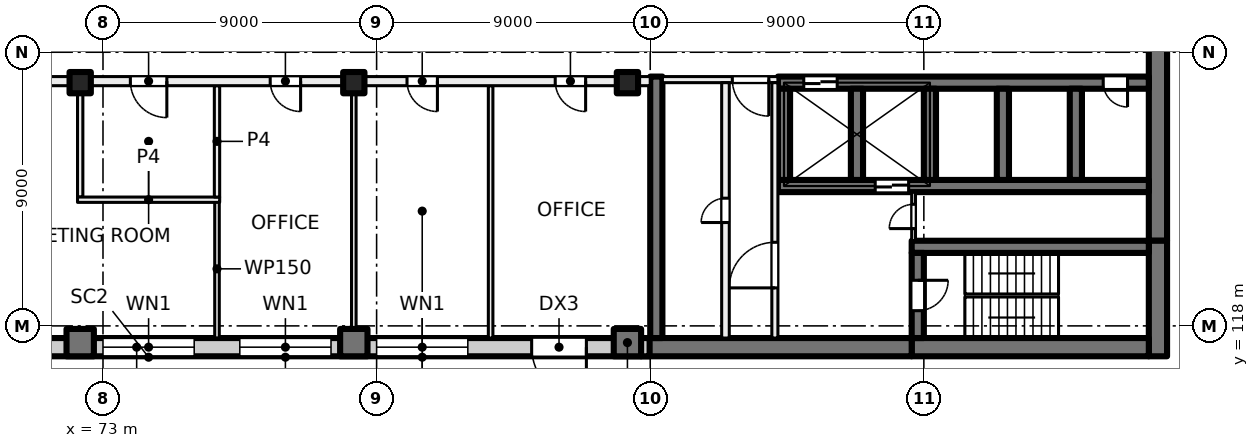
"""IFC4 building model, lengths in metres.
Left out: names, types, materials, properties, quantities, classifications, styles, units other than length and angle.
Written with IfcOpenShell. Run it as: python <this file> out.ifc"""

import sys

from ifc_helpers import new_model, si_unit, direction, frame, frame_2d, origin, origin_2d, place, context, subcontext, project, spatial, rectangle, extrude, element, fill, save


model = new_model("IFC4")
c1 = context("Model", 3, precision=1e-05, world=origin(), true_north=direction((0.0, 1.0)))
c2 = subcontext(c1, "Body", "Model", "MODEL_VIEW")
j1 = project(units=[si_unit("LENGTHUNIT", "METRE"), si_unit("PLANEANGLEUNIT", "RADIAN")], contexts=[c1])
p1 = place(None, origin())
s1 = spatial("IfcSite", under=j1, at=p1, CompositionType="ELEMENT")
p2 = place(p1, origin())
s2 = spatial("IfcBuilding", under=s1, at=p2, CompositionType="ELEMENT")
p3 = place(p2, frame((0.0, 0.0, 27.5)))
s3 = spatial("IfcBuildingStorey", under=s2, at=p3, CompositionType="ELEMENT", Elevation=27.5)
for number, where, z_axis, x_axis in (
    (1, (72.25, 126.0, 0.0), (0.0, 0.0, 1.0), (1.0, 0.0, 0.0)),
    (2, (81.25, 126.0, 0.0), (0.0, 0.0, 1.0), (1.0, 0.0, 0.0)),
    (3, (90.25, 126.0, 0.0), (0.0, 0.0, 1.0), (1.0, 0.0, 0.0)),
):
    element("IfcColumn", number, at=place(p3, frame(where, z_axis=z_axis, x_axis=x_axis)), inside=s3, PredefinedType="COLUMN", context=c2, shape_type="SweptSolid", body=[
        extrude(rectangle(XDim=0.7, YDim=0.7, at=origin_2d()), origin(), (0.0, 0.0, 1.0), 4.0),
    ])
for number, where, z_axis, x_axis in (
    (4, (72.25, 117.45, 0.0), (0.0, 0.0, 1.0), (1.0, 0.0, 0.0)),
    (5, (81.25, 117.45, 0.0), (0.0, 0.0, 1.0), (1.0, 0.0, 0.0)),
    (6, (90.25, 117.45, 0.0), (0.0, 0.0, 1.0), (1.0, 0.0, 0.0)),
):
    element("IfcColumn", number, at=place(p3, frame(where, z_axis=z_axis, x_axis=x_axis)), inside=s3, PredefinedType="COLUMN", context=c2, shape_type="SweptSolid", body=[
        extrude(rectangle(XDim=0.9, YDim=0.9, at=origin_2d()), origin(), (0.0, 0.0, 1.0), 4.0),
    ])
p4 = place(p3, frame((107.7, 135.2, 0.0), z_axis=(0.0, 0.0, 1.0), x_axis=(0.0, -1.0, 0.0)))
e7 = element("IfcWall", 7, at=p4, inside=s3, PredefinedType="SHEAR", context=c2, shape_type="SweptSolid", body=[
    extrude(rectangle(XDim=14.4, YDim=0.6, at=frame_2d((7.2, 0.0))), origin(), (0.0, 0.0, 1.0), 4.0),
])
p5 = place(p3, frame((107.7, 120.8, 0.0), z_axis=(0.0, 0.0, 1.0), x_axis=(0.0, -1.0, 0.0)))
e8 = element("IfcWall", 8, at=p5, inside=s3, PredefinedType="SHEAR", context=c2, shape_type="SweptSolid", body=[
    extrude(rectangle(XDim=3.8, YDim=0.6, at=frame_2d((1.9, 0.0))), origin(), (0.0, 0.0, 1.0), 4.0),
])
p6 = place(p3, frame((107.4, 117.3, 0.0), z_axis=(0.0, 0.0, 1.0), x_axis=(-1.0, 0.0, 0.0)))
e9 = element("IfcWall", 9, at=p6, inside=s3, PredefinedType="SHEAR", context=c2, shape_type="SweptSolid", body=[
    extrude(rectangle(XDim=7.8, YDim=0.6, at=frame_2d((3.9, 0.0))), origin(), (0.0, 0.0, 1.0), 4.0),
])
p7 = place(p3, frame((99.6, 117.3, 0.0), z_axis=(0.0, 0.0, 1.0), x_axis=(-1.0, 0.0, 0.0)))
e10 = element("IfcWall", 10, at=p7, inside=s3, PredefinedType="SHEAR", context=c2, shape_type="SweptSolid", body=[
    extrude(rectangle(XDim=8.9, YDim=0.6, at=frame_2d((4.45, 0.0))), origin(), (0.0, 0.0, 1.0), 4.0),
])
p8 = place(p3, frame((107.4, 120.6, 0.0), z_axis=(0.0, 0.0, 1.0), x_axis=(-1.0, 0.0, 0.0)))
e11 = element("IfcWall", 11, at=p8, inside=s3, PredefinedType="SHEAR", context=c2, shape_type="SweptSolid", body=[
    extrude(rectangle(XDim=7.8, YDim=0.4, at=frame_2d((3.9, 0.0))), origin(), (0.0, 0.0, 1.0), 4.0),
])
p9 = place(p3, frame((99.8, 120.4, 0.0), z_axis=(0.0, 0.0, 1.0), x_axis=(0.0, -1.0, 0.0)))
e12 = element("IfcWall", 12, at=p9, inside=s3, PredefinedType="SHEAR", context=c2, shape_type="SweptSolid", body=[
    extrude(rectangle(XDim=2.8, YDim=0.4, at=frame_2d((1.4, 0.0))), origin(), (0.0, 0.0, 1.0), 4.0),
])
p10 = place(p9, frame((0.9, 0.0, 0.0)))
e13 = element("IfcOpeningElement", 13, at=p10, cuts=e12, PredefinedType="OPENING", context=c2, shape_type="SweptSolid", body=[
    extrude(rectangle(XDim=1.0, YDim=2.1, at=frame_2d((0.5, 1.05))), frame((0.0, 0.21, 0.0), z_axis=(0.0, -1.0, 0.0), x_axis=(1.0, 0.0, 0.0)), (0.0, 0.0, 1.0), 0.42),
])
p11 = place(p3, frame((107.4, 126.0, 0.0), z_axis=(0.0, 0.0, 1.0), x_axis=(-1.0, 0.0, 0.0)))
e14 = element("IfcWall", 14, at=p11, inside=s3, PredefinedType="SHEAR", context=c2, shape_type="SweptSolid", body=[
    extrude(rectangle(XDim=12.2, YDim=0.4, at=frame_2d((6.1, 0.0))), origin(), (0.0, 0.0, 1.0), 4.0),
])
p12 = place(p11, frame((10.25, 0.0, 0.0)))
e15 = element("IfcOpeningElement", 15, at=p12, cuts=e14, PredefinedType="OPENING", context=c2, shape_type="SweptSolid", body=[
    extrude(rectangle(XDim=1.1, YDim=2.1, at=frame_2d((0.55, 1.05))), frame((0.0, 0.21, 0.0), z_axis=(0.0, -1.0, 0.0), x_axis=(1.0, 0.0, 0.0)), (0.0, 0.0, 1.0), 0.42),
])
p13 = place(p11, frame((0.7, 0.0, 0.0)))
e16 = element("IfcOpeningElement", 16, at=p13, cuts=e14, PredefinedType="OPENING", context=c2, shape_type="SweptSolid", body=[
    extrude(rectangle(XDim=0.8, YDim=2.1, at=frame_2d((0.4, 1.05))), frame((0.0, 0.21, 0.0), z_axis=(0.0, -1.0, 0.0), x_axis=(1.0, 0.0, 0.0)), (0.0, 0.0, 1.0), 0.42),
])
p14 = place(p3, frame((107.4, 122.6, 0.0), z_axis=(0.0, 0.0, 1.0), x_axis=(-1.0, 0.0, 0.0)))
e17 = element("IfcWall", 17, at=p14, inside=s3, PredefinedType="SHEAR", context=c2, shape_type="SweptSolid", body=[
    extrude(rectangle(XDim=12.2, YDim=0.4, at=frame_2d((6.1, 0.0))), origin(), (0.0, 0.0, 1.0), 4.0),
])
p15 = place(p14, frame((7.9, 0.0, 0.0)))
e18 = element("IfcOpeningElement", 18, at=p15, cuts=e17, PredefinedType="OPENING", context=c2, shape_type="SweptSolid", body=[
    extrude(rectangle(XDim=1.1, YDim=2.1, at=frame_2d((0.55, 1.05))), frame((0.0, 0.21, 0.0), z_axis=(0.0, -1.0, 0.0), x_axis=(1.0, 0.0, 0.0)), (0.0, 0.0, 1.0), 0.42),
])
for number, where, z_axis, x_axis in (
    (19, (105.0, 125.8, 0.0), (0.0, 0.0, 1.0), (0.0, -1.0, 0.0)),
    (20, (102.6, 125.8, 0.0), (0.0, 0.0, 1.0), (0.0, -1.0, 0.0)),
    (21, (100.2, 125.8, 0.0), (0.0, 0.0, 1.0), (0.0, -1.0, 0.0)),
    (22, (97.8, 125.8, 0.0), (0.0, 0.0, 1.0), (0.0, -1.0, 0.0)),
    (23, (95.4, 125.8, 0.0), (0.0, 0.0, 1.0), (0.0, -1.0, 0.0)),
):
    element("IfcWall", number, at=place(p3, frame(where, z_axis=z_axis, x_axis=x_axis)), inside=s3, PredefinedType="SHEAR", context=c2, shape_type="SweptSolid", body=[
        extrude(rectangle(XDim=3.0, YDim=0.4, at=frame_2d((1.5, 0.0))), origin(), (0.0, 0.0, 1.0), 4.0),
    ])
p16 = place(p3, frame((91.2, 126.2, 0.0), z_axis=(0.0, 0.0, 1.0), x_axis=(0.0, -1.0, 0.0)))
e24 = element("IfcWall", 24, at=p16, inside=s3, PredefinedType="SHEAR", context=c2, shape_type="SweptSolid", body=[
    extrude(rectangle(XDim=8.6, YDim=0.4, at=frame_2d((4.3, 0.0))), origin(), (0.0, 0.0, 1.0), 4.0),
])
p17 = place(p3, frame((90.98, 117.3, 0.0), z_axis=(0.0, 0.0, 1.0), x_axis=(-1.0, 0.0, 0.0)))
e25 = element("IfcWall", 25, at=p17, inside=s3, PredefinedType="SOLIDWALL", context=c2, shape_type="SweptSolid", body=[
    extrude(rectangle(XDim=33.745, YDim=0.6, at=frame_2d((16.873, 0.0))), origin(), (0.0, 0.0, 1.0), 3.625),
])
p18 = place(p17, frame((2.08, 0.0, 0.0)))
e26 = element("IfcOpeningElement", 26, at=p18, cuts=e25, PredefinedType="OPENING", context=c2, shape_type="SweptSolid", body=[
    extrude(rectangle(XDim=1.8, YDim=2.4, at=frame_2d((0.9, 1.2))), frame((0.0, 0.31, 0.0), z_axis=(0.0, -1.0, 0.0), x_axis=(1.0, 0.0, 0.0)), (0.0, 0.0, 1.0), 0.62),
])
p19 = place(p17, frame((5.98, 0.0, 0.9)))
e27 = element("IfcOpeningElement", 27, at=p19, cuts=e25, PredefinedType="OPENING", context=c2, shape_type="SweptSolid", body=[
    extrude(rectangle(XDim=3.0, YDim=2.4, at=frame_2d((1.5, 1.2))), frame((0.0, 0.31, 0.0), z_axis=(0.0, -1.0, 0.0), x_axis=(1.0, 0.0, 0.0)), (0.0, 0.0, 1.0), 0.62),
])
p20 = place(p17, frame((10.48, 0.0, 0.9)))
e28 = element("IfcOpeningElement", 28, at=p20, cuts=e25, PredefinedType="OPENING", context=c2, shape_type="SweptSolid", body=[
    extrude(rectangle(XDim=3.0, YDim=2.4, at=frame_2d((1.5, 1.2))), frame((0.0, 0.31, 0.0), z_axis=(0.0, -1.0, 0.0), x_axis=(1.0, 0.0, 0.0)), (0.0, 0.0, 1.0), 0.62),
])
p21 = place(p17, frame((14.98, 0.0, 0.9)))
e29 = element("IfcOpeningElement", 29, at=p21, cuts=e25, PredefinedType="OPENING", context=c2, shape_type="SweptSolid", body=[
    extrude(rectangle(XDim=3.0, YDim=2.4, at=frame_2d((1.5, 1.2))), frame((0.0, 0.31, 0.0), z_axis=(0.0, -1.0, 0.0), x_axis=(1.0, 0.0, 0.0)), (0.0, 0.0, 1.0), 0.62),
])
p22 = place(p17, frame((20.08, 0.0, 0.0)))
e30 = element("IfcOpeningElement", 30, at=p22, cuts=e25, PredefinedType="OPENING", context=c2, shape_type="SweptSolid", body=[
    extrude(rectangle(XDim=1.8, YDim=2.4, at=frame_2d((0.9, 1.2))), frame((0.0, 0.31, 0.0), z_axis=(0.0, -1.0, 0.0), x_axis=(1.0, 0.0, 0.0)), (0.0, 0.0, 1.0), 0.62),
])
p23 = place(p17, frame((23.98, 0.0, 0.9)))
e31 = element("IfcOpeningElement", 31, at=p23, cuts=e25, PredefinedType="OPENING", context=c2, shape_type="SweptSolid", body=[
    extrude(rectangle(XDim=3.0, YDim=2.4, at=frame_2d((1.5, 1.2))), frame((0.0, 0.31, 0.0), z_axis=(0.0, -1.0, 0.0), x_axis=(1.0, 0.0, 0.0)), (0.0, 0.0, 1.0), 0.62),
])
p24 = place(p17, frame((28.48, 0.0, 0.9)))
e32 = element("IfcOpeningElement", 32, at=p24, cuts=e25, PredefinedType="OPENING", context=c2, shape_type="SweptSolid", body=[
    extrude(rectangle(XDim=3.0, YDim=2.4, at=frame_2d((1.5, 1.2))), frame((0.0, 0.31, 0.0), z_axis=(0.0, -1.0, 0.0), x_axis=(1.0, 0.0, 0.0)), (0.0, 0.0, 1.0), 0.62),
])
p25 = place(p3, frame((95.2, 126.1, 0.0), z_axis=(0.0, 0.0, 1.0), x_axis=(-1.0, 0.0, 0.0)))
e33 = element("IfcWall", 33, at=p25, inside=s3, PredefinedType="PARTITIONING", context=c2, shape_type="SweptSolid", body=[
    extrude(rectangle(XDim=3.8, YDim=0.2, at=frame_2d((1.9, 0.0))), origin(), (0.0, 0.0, 1.0), 3.625),
])
p26 = place(p25, frame((0.3, 0.0, 0.0)))
e34 = element("IfcOpeningElement", 34, at=p26, cuts=e33, PredefinedType="OPENING", context=c2, shape_type="SweptSolid", body=[
    extrude(rectangle(XDim=1.2, YDim=2.1, at=frame_2d((0.6, 1.05))), frame((0.0, 0.11, 0.0), z_axis=(0.0, -1.0, 0.0), x_axis=(1.0, 0.0, 0.0)), (0.0, 0.0, 1.0), 0.22),
])
p27 = place(p3, frame((95.1, 117.6, 0.0), z_axis=(0.0, 0.0, 1.0), x_axis=(0.0, 1.0, 0.0)))
e35 = element("IfcWall", 35, at=p27, inside=s3, PredefinedType="PARTITIONING", context=c2, shape_type="SweptSolid", body=[
    extrude(rectangle(XDim=8.4, YDim=0.2, at=frame_2d((4.2, 0.0))), origin(), (0.0, 0.0, 1.0), 3.625),
])
p28 = place(p27, frame((1.65, 0.0, 0.0)))
e36 = element("IfcOpeningElement", 36, at=p28, cuts=e35, PredefinedType="OPENING", context=c2, shape_type="SweptSolid", body=[
    extrude(rectangle(XDim=1.5, YDim=2.1, at=frame_2d((0.75, 1.05))), frame((0.0, 0.11, 0.0), z_axis=(0.0, -1.0, 0.0), x_axis=(1.0, 0.0, 0.0)), (0.0, 0.0, 1.0), 0.22),
])
p29 = place(p3, frame((93.475, 117.6, 0.0), z_axis=(0.0, 0.0, 1.0), x_axis=(0.0, 1.0, 0.0)))
e37 = element("IfcWall", 37, at=p29, inside=s3, PredefinedType="PARTITIONING", context=c2, shape_type="SweptSolid", body=[
    extrude(rectangle(XDim=8.4, YDim=0.25, at=frame_2d((4.2, 0.0))), origin(), (0.0, 0.0, 1.0), 3.625),
])
p30 = place(p29, frame((3.8, 0.0, 0.0)))
e38 = element("IfcOpeningElement", 38, at=p30, cuts=e37, PredefinedType="OPENING", context=c2, shape_type="SweptSolid", body=[
    extrude(rectangle(XDim=0.8, YDim=2.1, at=frame_2d((0.4, 1.05))), frame((0.0, 0.135, 0.0), z_axis=(0.0, -1.0, 0.0), x_axis=(1.0, 0.0, 0.0)), (0.0, 0.0, 1.0), 0.27),
])
p31 = place(p3, frame((99.663, 120.8, 0.0), z_axis=(0.0, 0.0, 1.0), x_axis=(0.0, 1.0, 0.0)))
e39 = element("IfcWall", 39, at=p31, inside=s3, PredefinedType="PARTITIONING", context=c2, shape_type="SweptSolid", body=[
    extrude(rectangle(XDim=1.6, YDim=0.125, at=frame_2d((0.8, 0.0))), origin(), (0.0, 0.0, 1.0), 3.625),
])
p32 = place(p31, frame((0.4, 0.0, 0.0)))
e40 = element("IfcOpeningElement", 40, at=p32, cuts=e39, PredefinedType="OPENING", context=c2, shape_type="SweptSolid", body=[
    extrude(rectangle(XDim=0.8, YDim=2.1, at=frame_2d((0.4, 1.05))), frame((0.0, 0.073, 0.0), z_axis=(0.0, -1.0, 0.0), x_axis=(1.0, 0.0, 0.0)), (0.0, 0.0, 1.0), 0.145),
])
p33 = place(p3, frame((72.25, 122.238, 0.0), z_axis=(0.0, 0.0, 1.0), x_axis=(0.0, 1.0, 0.0)))
e41 = element("IfcWall", 41, at=p33, inside=s3, PredefinedType="PARTITIONING", context=c2, shape_type="SweptSolid", body=[
    extrude(rectangle(XDim=3.662, YDim=0.175, at=frame_2d((1.831, 0.0))), origin(), (0.0, 0.0, 1.0), 3.625),
])
p34 = place(p3, frame((76.75, 117.6, 0.0), z_axis=(0.0, 0.0, 1.0), x_axis=(0.0, 1.0, 0.0)))
e42 = element("IfcWall", 42, at=p34, inside=s3, PredefinedType="PARTITIONING", context=c2, shape_type="SweptSolid", body=[
    extrude(rectangle(XDim=4.553, YDim=0.15, at=frame_2d((2.276, 0.0))), origin(), (0.0, 0.0, 1.0), 3.625),
])
p35 = place(p3, frame((76.838, 122.15, 0.0), z_axis=(0.0, 0.0, 1.0), x_axis=(-1.0, 0.0, 0.0)))
e43 = element("IfcWall", 43, at=p35, inside=s3, PredefinedType="PARTITIONING", context=c2, shape_type="SweptSolid", body=[
    extrude(rectangle(XDim=4.676, YDim=0.175, at=frame_2d((2.338, 0.0))), origin(), (0.0, 0.0, 1.0), 3.625),
])
p36 = place(p3, frame((76.75, 122.238, 0.0), z_axis=(0.0, 0.0, 1.0), x_axis=(0.0, 1.0, 0.0)))
e44 = element("IfcWall", 44, at=p36, inside=s3, PredefinedType="PARTITIONING", context=c2, shape_type="SweptSolid", body=[
    extrude(rectangle(XDim=3.662, YDim=0.175, at=frame_2d((1.831, 0.0))), origin(), (0.0, 0.0, 1.0), 3.625),
])
for number, where, z_axis, x_axis in (
    (45, (81.25, 117.6, 0.0), (0.0, 0.0, 1.0), (0.0, 1.0, 0.0)),
    (46, (85.75, 117.6, 0.0), (0.0, 0.0, 1.0), (0.0, 1.0, 0.0)),
):
    element("IfcWall", number, at=place(p3, frame(where, z_axis=z_axis, x_axis=x_axis)), inside=s3, PredefinedType="PARTITIONING", context=c2, shape_type="SweptSolid", body=[
        extrude(rectangle(XDim=8.3, YDim=0.15, at=frame_2d((4.15, 0.0))), origin(), (0.0, 0.0, 1.0), 3.625),
    ])
p37 = place(p3, frame((91.0, 126.05, 0.0), z_axis=(0.0, 0.0, 1.0), x_axis=(-1.0, 0.0, 0.0)))
e47 = element("IfcWall", 47, at=p37, inside=s3, PredefinedType="PARTITIONING", context=c2, shape_type="SweptSolid", body=[
    extrude(rectangle(XDim=43.785, YDim=0.3, at=frame_2d((21.893, 0.0))), origin(), (0.0, 0.0, 1.0), 3.625),
])
p38 = place(p37, frame((2.125, 0.0, 0.0)))
e48 = element("IfcOpeningElement", 48, at=p38, cuts=e47, PredefinedType="OPENING", context=c2, shape_type="SweptSolid", body=[
    extrude(rectangle(XDim=1.0, YDim=2.1, at=frame_2d((0.5, 1.05))), frame((0.0, 0.16, 0.0), z_axis=(0.0, -1.0, 0.0), x_axis=(1.0, 0.0, 0.0)), (0.0, 0.0, 1.0), 0.32),
])
p39 = place(p37, frame((7.0, 0.0, 0.0)))
e49 = element("IfcOpeningElement", 49, at=p39, cuts=e47, PredefinedType="OPENING", context=c2, shape_type="SweptSolid", body=[
    extrude(rectangle(XDim=1.0, YDim=2.1, at=frame_2d((0.5, 1.05))), frame((0.0, 0.16, 0.0), z_axis=(0.0, -1.0, 0.0), x_axis=(1.0, 0.0, 0.0)), (0.0, 0.0, 1.0), 0.32),
])
p40 = place(p37, frame((11.5, 0.0, 0.0)))
e50 = element("IfcOpeningElement", 50, at=p40, cuts=e47, PredefinedType="OPENING", context=c2, shape_type="SweptSolid", body=[
    extrude(rectangle(XDim=1.0, YDim=2.1, at=frame_2d((0.5, 1.05))), frame((0.0, 0.16, 0.0), z_axis=(0.0, -1.0, 0.0), x_axis=(1.0, 0.0, 0.0)), (0.0, 0.0, 1.0), 0.32),
])
p41 = place(p37, frame((15.9, 0.0, 0.0)))
e51 = element("IfcOpeningElement", 51, at=p41, cuts=e47, PredefinedType="OPENING", context=c2, shape_type="SweptSolid", body=[
    extrude(rectangle(XDim=1.2, YDim=2.1, at=frame_2d((0.6, 1.05))), frame((0.0, 0.16, 0.0), z_axis=(0.0, -1.0, 0.0), x_axis=(1.0, 0.0, 0.0)), (0.0, 0.0, 1.0), 0.32),
])
p42 = place(p37, frame((22.35, 0.0, 0.0)))
e52 = element("IfcOpeningElement", 52, at=p42, cuts=e47, PredefinedType="OPENING", context=c2, shape_type="SweptSolid", body=[
    extrude(rectangle(XDim=1.8, YDim=2.1, at=frame_2d((0.9, 1.05))), frame((0.0, 0.16, 0.0), z_axis=(0.0, -1.0, 0.0), x_axis=(1.0, 0.0, 0.0)), (0.0, 0.0, 1.0), 0.32),
])
p43 = place(p37, frame((34.0, 0.0, 0.0)))
e53 = element("IfcOpeningElement", 53, at=p43, cuts=e47, PredefinedType="OPENING", context=c2, shape_type="SweptSolid", body=[
    extrude(rectangle(XDim=1.0, YDim=2.1, at=frame_2d((0.5, 1.05))), frame((0.0, 0.16, 0.0), z_axis=(0.0, -1.0, 0.0), x_axis=(1.0, 0.0, 0.0)), (0.0, 0.0, 1.0), 0.32),
])
p44 = place(p37, frame((39.296, 0.0, 0.0)))
e54 = element("IfcOpeningElement", 54, at=p44, cuts=e47, PredefinedType="OPENING", context=c2, shape_type="SweptSolid", body=[
    extrude(rectangle(XDim=1.8, YDim=2.1, at=frame_2d((0.9, 1.05))), frame((0.0, 0.16, 0.0), z_axis=(0.0, -1.0, 0.0), x_axis=(1.0, 0.0, 0.0)), (0.0, 0.0, 1.0), 0.32),
])
p45 = place(p18, origin())
e55 = element("IfcDoor", 55, at=p45, inside=s3, OperationType="DOUBLE_DOOR_SINGLE_SWING", PredefinedType="DOOR", context=c2, shape_type="SweptSolid", body=[
    extrude(rectangle(XDim=1.8, YDim=2.4, at=frame_2d((0.9, 1.2))), frame((0.0, 0.025, 0.0), z_axis=(0.0, -1.0, 0.0), x_axis=(1.0, 0.0, 0.0)), (0.0, 0.0, 1.0), 0.05),
])
fill(e26, e55)
p46 = place(p19, origin())
e56 = element("IfcWindow", 56, at=p46, inside=s3, PartitioningType="SINGLE_PANEL", PredefinedType="WINDOW", context=c2, shape_type="SweptSolid", body=[
    extrude(rectangle(XDim=3.0, YDim=2.4, at=frame_2d((1.5, 1.2))), frame((0.0, 0.03, 0.0), z_axis=(0.0, -1.0, 0.0), x_axis=(1.0, 0.0, 0.0)), (0.0, 0.0, 1.0), 0.06),
])
fill(e27, e56)
p47 = place(p20, origin())
e57 = element("IfcWindow", 57, at=p47, inside=s3, PartitioningType="SINGLE_PANEL", PredefinedType="WINDOW", context=c2, shape_type="SweptSolid", body=[
    extrude(rectangle(XDim=3.0, YDim=2.4, at=frame_2d((1.5, 1.2))), frame((0.0, 0.03, 0.0), z_axis=(0.0, -1.0, 0.0), x_axis=(1.0, 0.0, 0.0)), (0.0, 0.0, 1.0), 0.06),
])
fill(e28, e57)
p48 = place(p21, origin())
e58 = element("IfcWindow", 58, at=p48, inside=s3, PartitioningType="SINGLE_PANEL", PredefinedType="WINDOW", context=c2, shape_type="SweptSolid", body=[
    extrude(rectangle(XDim=3.0, YDim=2.4, at=frame_2d((1.5, 1.2))), frame((0.0, 0.03, 0.0), z_axis=(0.0, -1.0, 0.0), x_axis=(1.0, 0.0, 0.0)), (0.0, 0.0, 1.0), 0.06),
])
fill(e29, e58)
p49 = place(p12, origin())
e59 = element("IfcDoor", 59, at=p49, inside=s3, OperationType="DOUBLE_DOOR_SLIDING", PredefinedType="DOOR", context=c2, shape_type="SweptSolid", body=[
    extrude(rectangle(XDim=1.1, YDim=2.1, at=frame_2d((0.55, 1.05))), frame((0.0, 0.025, 0.0), z_axis=(0.0, -1.0, 0.0), x_axis=(1.0, 0.0, 0.0)), (0.0, 0.0, 1.0), 0.05),
])
fill(e15, e59)
p50 = place(p13, origin())
e60 = element("IfcDoor", 60, at=p50, inside=s3, OperationType="SINGLE_SWING_LEFT", PredefinedType="DOOR", context=c2, shape_type="SweptSolid", body=[
    extrude(rectangle(XDim=0.8, YDim=2.1, at=frame_2d((0.4, 1.05))), frame((0.0, 0.025, 0.0), z_axis=(0.0, -1.0, 0.0), x_axis=(1.0, 0.0, 0.0)), (0.0, 0.0, 1.0), 0.05),
])
fill(e16, e60)
p51 = place(p26, origin())
e61 = element("IfcDoor", 61, at=p51, inside=s3, OperationType="DOUBLE_DOOR_SINGLE_SWING", PredefinedType="DOOR", context=c2, shape_type="SweptSolid", body=[
    extrude(rectangle(XDim=1.2, YDim=2.1, at=frame_2d((0.6, 1.05))), frame((0.0, 0.025, 0.0), z_axis=(0.0, -1.0, 0.0), x_axis=(1.0, 0.0, 0.0)), (0.0, 0.0, 1.0), 0.05),
])
fill(e34, e61)
p52 = place(p28, origin())
e62 = element("IfcDoor", 62, at=p52, inside=s3, OperationType="DOUBLE_DOOR_SINGLE_SWING", PredefinedType="DOOR", context=c2, shape_type="SweptSolid", body=[
    extrude(rectangle(XDim=1.5, YDim=2.1, at=frame_2d((0.75, 1.05))), frame((0.0, 0.025, 0.0), z_axis=(0.0, -1.0, 0.0), x_axis=(1.0, 0.0, 0.0)), (0.0, 0.0, 1.0), 0.05),
])
fill(e36, e62)
p53 = place(p10, origin())
e63 = element("IfcDoor", 63, at=p53, inside=s3, OperationType="SINGLE_SWING_LEFT", PredefinedType="DOOR", context=c2, shape_type="SweptSolid", body=[
    extrude(rectangle(XDim=1.0, YDim=2.1, at=frame_2d((0.5, 1.05))), frame((0.0, 0.025, 0.0), z_axis=(0.0, -1.0, 0.0), x_axis=(1.0, 0.0, 0.0)), (0.0, 0.0, 1.0), 0.05),
])
fill(e13, e63)
p54 = place(p32, origin())
e64 = element("IfcDoor", 64, at=p54, inside=s3, OperationType="SINGLE_SWING_RIGHT", PredefinedType="DOOR", context=c2, shape_type="SweptSolid", body=[
    extrude(rectangle(XDim=0.8, YDim=2.1, at=frame_2d((0.4, 1.05))), frame((0.0, 0.025, 0.0), z_axis=(0.0, -1.0, 0.0), x_axis=(1.0, 0.0, 0.0)), (0.0, 0.0, 1.0), 0.05),
])
fill(e40, e64)
p55 = place(p30, origin())
e65 = element("IfcDoor", 65, at=p55, inside=s3, OperationType="SINGLE_SWING_LEFT", PredefinedType="DOOR", context=c2, shape_type="SweptSolid", body=[
    extrude(rectangle(XDim=0.8, YDim=2.1, at=frame_2d((0.4, 1.05))), frame((0.0, 0.025, 0.0), z_axis=(0.0, -1.0, 0.0), x_axis=(1.0, 0.0, 0.0)), (0.0, 0.0, 1.0), 0.05),
])
fill(e38, e65)
p56 = place(p15, origin())
e66 = element("IfcDoor", 66, at=p56, inside=s3, OperationType="DOUBLE_DOOR_SLIDING", PredefinedType="DOOR", context=c2, shape_type="SweptSolid", body=[
    extrude(rectangle(XDim=1.1, YDim=2.1, at=frame_2d((0.55, 1.05))), frame((0.0, 0.025, 0.0), z_axis=(0.0, -1.0, 0.0), x_axis=(1.0, 0.0, 0.0)), (0.0, 0.0, 1.0), 0.05),
])
fill(e18, e66)
p57 = place(p38, origin())
e67 = element("IfcDoor", 67, at=p57, inside=s3, OperationType="SINGLE_SWING_LEFT", PredefinedType="DOOR", context=c2, shape_type="SweptSolid", body=[
    extrude(rectangle(XDim=1.0, YDim=2.1, at=frame_2d((0.5, 1.05))), frame((0.0, 0.025, 0.0), z_axis=(0.0, -1.0, 0.0), x_axis=(1.0, 0.0, 0.0)), (0.0, 0.0, 1.0), 0.05),
])
fill(e48, e67)
p58 = place(p39, origin())
e68 = element("IfcDoor", 68, at=p58, inside=s3, OperationType="SINGLE_SWING_RIGHT", PredefinedType="DOOR", context=c2, shape_type="SweptSolid", body=[
    extrude(rectangle(XDim=1.0, YDim=2.1, at=frame_2d((0.5, 1.05))), frame((0.0, 0.025, 0.0), z_axis=(0.0, -1.0, 0.0), x_axis=(1.0, 0.0, 0.0)), (0.0, 0.0, 1.0), 0.05),
])
fill(e49, e68)
p59 = place(p40, origin())
e69 = element("IfcDoor", 69, at=p59, inside=s3, OperationType="SINGLE_SWING_LEFT", PredefinedType="DOOR", context=c2, shape_type="SweptSolid", body=[
    extrude(rectangle(XDim=1.0, YDim=2.1, at=frame_2d((0.5, 1.05))), frame((0.0, 0.025, 0.0), z_axis=(0.0, -1.0, 0.0), x_axis=(1.0, 0.0, 0.0)), (0.0, 0.0, 1.0), 0.05),
])
fill(e50, e69)
p60 = place(p41, origin())
e70 = element("IfcDoor", 70, at=p60, inside=s3, OperationType="DOUBLE_DOOR_SINGLE_SWING", PredefinedType="DOOR", context=c2, shape_type="SweptSolid", body=[
    extrude(rectangle(XDim=1.2, YDim=2.1, at=frame_2d((0.6, 1.05))), frame((0.0, 0.025, 0.0), z_axis=(0.0, -1.0, 0.0), x_axis=(1.0, 0.0, 0.0)), (0.0, 0.0, 1.0), 0.05),
])
fill(e51, e70)
save(model, sys.argv[1])
